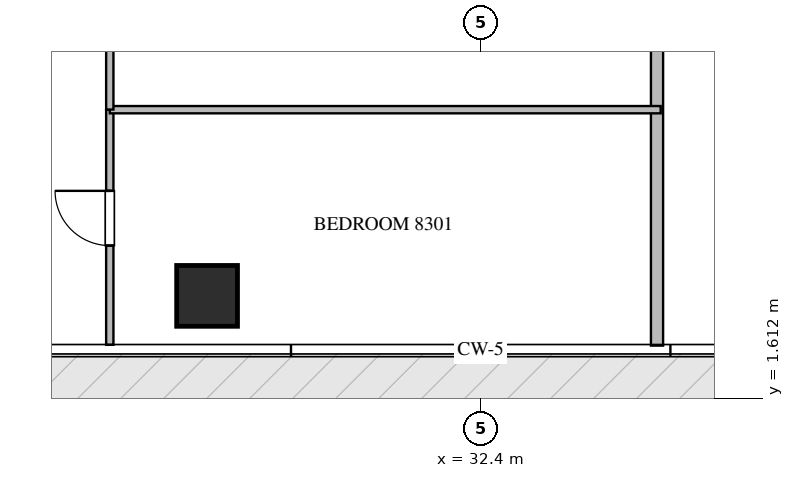
"""IFC4 building model, lengths in metres.
Left out: names, types, materials, properties, quantities, classifications, styles, units other than length and angle.
Written with IfcOpenShell. Run it as: python <this file> out.ifc"""

import sys

from ifc_helpers import new_model, si_unit, direction, frame, frame_2d, origin, origin_2d, place, context, subcontext, project, spatial, rectangle, extrude, source, transform, mapped, element, fill, save


model = new_model("IFC4")
c1 = context("Model", 3, precision=1e-05, world=origin(), true_north=direction((0.0, 1.0)))
c2 = subcontext(c1, "Body", "Model", "MODEL_VIEW")
j1 = project(units=[si_unit("LENGTHUNIT", "METRE"), si_unit("PLANEANGLEUNIT", "RADIAN")], contexts=[c1])
p1 = place(None, origin())
s1 = spatial("IfcSite", under=j1, at=p1, CompositionType="ELEMENT")
p2 = place(p1, origin())
s2 = spatial("IfcBuilding", under=s1, at=p2, CompositionType="ELEMENT")
p3 = place(p2, frame((0.0, 0.0, 333.95)))
s3 = spatial("IfcBuildingStorey", under=s2, at=p3, CompositionType="ELEMENT", Elevation=333.95)
m1 = source(origin(), c2, "Body", "SweptSolid", [
    extrude(rectangle(XDim=1.0, YDim=1.0, at=origin_2d()), origin(), (0.0, 0.0, 1.0), 3.87),
])
p4 = place(p3, frame((27.9, 3.3, -0.26), z_axis=(0.0, 0.0, 1.0), x_axis=(1.0, 0.0, 0.0)))
e1 = element("IfcColumn", 1, at=p4, inside=s3, PredefinedType="COLUMN", context=c2, shape_type="MappedRepresentation", body=[
    mapped(m1, transform((0.0, 0.0, 0.0), scale=1.0)),
])
p5 = place(p3, frame((35.3, 2.482, 0.0), z_axis=(0.0, 0.0, 1.0), x_axis=(0.0, 1.0, 0.0)))
e2 = element("IfcWall", 2, at=p5, inside=s3, PredefinedType="PARTITIONING", context=c2, shape_type="SweptSolid", body=[
    extrude(rectangle(XDim=14.143, YDim=0.2, at=frame_2d((7.072, 0.0))), origin(), (0.0, 0.0, 1.0), 3.61),
])
p6 = place(p3, frame((26.3, 2.495, 0.0), z_axis=(0.0, 0.0, 1.0), x_axis=(0.0, 1.0, 0.0)))
e3 = element("IfcWall", 3, at=p6, inside=s3, PredefinedType="PARTITIONING", context=c2, shape_type="SweptSolid", body=[
    extrude(rectangle(XDim=3.867, YDim=0.12, at=frame_2d((1.934, 0.0))), origin(), (0.0, 0.0, 1.0), 3.61),
])
p7 = place(p6, frame((1.632, 0.0, 0.0)))
e4 = element("IfcOpeningElement", 4, at=p7, cuts=e3, PredefinedType="OPENING", context=c2, shape_type="SweptSolid", body=[
    extrude(rectangle(XDim=0.9, YDim=2.1, at=frame_2d((0.45, 1.05))), frame((0.0, 0.07, 0.0), z_axis=(0.0, -1.0, 0.0), x_axis=(1.0, 0.0, 0.0)), (0.0, 0.0, 1.0), 0.14),
])
p8 = place(p3, frame((26.3, 6.362, 0.0), z_axis=(0.0, 0.0, 1.0), x_axis=(1.0, 0.0, 0.0)))
e5 = element("IfcWall", 5, at=p8, inside=s3, PredefinedType="PARTITIONING", context=c2, shape_type="SweptSolid", body=[
    extrude(rectangle(XDim=9.06, YDim=0.12, at=frame_2d((4.53, 0.0))), origin(), (0.0, 0.0, 1.0), 3.61),
])
p9 = place(p3, frame((26.3, 6.364, 0.0), z_axis=(0.0, 0.0, 1.0), x_axis=(0.0, 1.0, 0.0)))
e6 = element("IfcWall", 6, at=p9, inside=s3, PredefinedType="PARTITIONING", context=c2, shape_type="SweptSolid", body=[
    extrude(rectangle(XDim=8.386, YDim=0.12, at=frame_2d((4.193, 0.0))), origin(), (0.0, 0.0, 1.0), 3.61),
])
p10 = place(p9, frame((3.768, 0.0, 0.0)))
e7 = element("IfcOpeningElement", 7, at=p10, cuts=e6, PredefinedType="OPENING", context=c2, shape_type="SweptSolid", body=[
    extrude(rectangle(XDim=0.85, YDim=2.1, at=frame_2d((0.425, 1.05))), frame((0.0, 0.07, 0.0), z_axis=(0.0, -1.0, 0.0), x_axis=(1.0, 0.0, 0.0)), (0.0, 0.0, 1.0), 0.14),
])
m2 = source(origin(), c2, "Body", "SweptSolid", [
    extrude(rectangle(XDim=0.9, YDim=2.1, at=frame_2d((0.45, 1.05))), frame((0.0, 0.025, 0.0), z_axis=(0.0, -1.0, 0.0), x_axis=(1.0, 0.0, 0.0)), (0.0, 0.0, 1.0), 0.05),
])
p11 = place(p7, origin())
e8 = element("IfcDoor", 8, at=p11, inside=s3, OperationType="SINGLE_SWING_RIGHT", PredefinedType="DOOR", context=c2, shape_type="MappedRepresentation", body=[
    mapped(m2, transform((0.0, 0.0, 0.0), scale=1.0)),
])
fill(e4, e8)
save(model, sys.argv[1])
